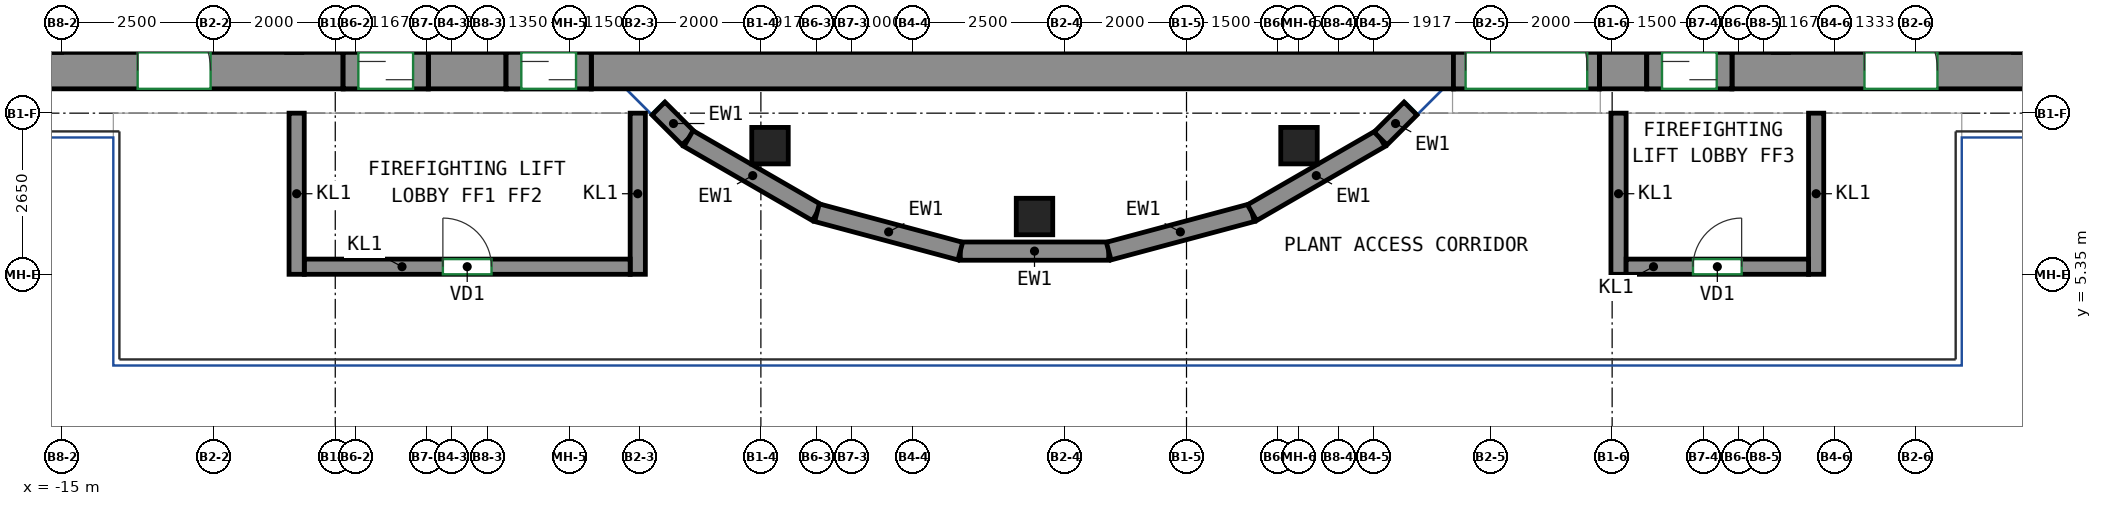
"""IFC4 building model, lengths in metres.
Left out: names, types, materials, properties, quantities, classifications, styles, units other than length and angle.
Written with IfcOpenShell. Run it as: python <this file> out.ifc"""

import sys

from ifc_helpers import new_model, si_unit, direction, frame, frame_2d, origin, origin_2d, place, context, subcontext, project, spatial, rectangle, extrude, source, transform, mapped, element, fill, save


model = new_model("IFC4")
c1 = context("Model", 3, precision=1e-05, world=origin(), true_north=direction((0.0, 1.0)))
c2 = subcontext(c1, "Body", "Model", "MODEL_VIEW")
j1 = project(units=[si_unit("LENGTHUNIT", "METRE"), si_unit("PLANEANGLEUNIT", "RADIAN")], contexts=[c1])
p1 = place(None, origin())
s1 = spatial("IfcSite", under=j1, at=p1, CompositionType="ELEMENT")
p2 = place(p1, origin())
s2 = spatial("IfcBuilding", under=s1, at=p2, CompositionType="ELEMENT")
p3 = place(p2, frame((0.0, 0.0, 323.8)))
s3 = spatial("IfcBuildingStorey", under=s2, at=p3, CompositionType="ELEMENT", Elevation=323.8)
m1 = source(origin(), c2, "Body", "SweptSolid", [
    extrude(rectangle(XDim=0.6, YDim=0.6, at=origin_2d()), origin(), (0.0, 0.0, 1.0), 4.6),
])
for number, where, z_axis, x_axis in (
    (1, (-3.35, 7.466, 0.0), (0.0, 0.0, 1.0), (1.0, 0.0, 0.0)),
    (2, (1.0, 6.3, 0.0), (0.0, 0.0, 1.0), (1.0, 0.0, 0.0)),
    (3, (5.35, 7.466, 0.0), (0.0, 0.0, 1.0), (1.0, 0.0, 0.0)),
):
    element("IfcColumn", number, at=place(p3, frame(where, z_axis=z_axis, x_axis=x_axis)), inside=s3, PredefinedType="COLUMN", context=c2, shape_type="MappedRepresentation", body=[
        mapped(m1, transform((0.0, 0.0, 0.0))),
    ])
m2 = source(origin(), c2, "Body", "SweptSolid", [
    extrude(rectangle(XDim=5.23, YDim=0.6, at=frame_2d((2.615, 0.0))), origin(), (0.0, 0.0, 1.0), 5.0),
])
p4 = place(p3, frame((-15.6, 8.7, -0.4), z_axis=(0.0, 0.0, 1.0), x_axis=(1.0, 0.0, 0.0)))
e4 = element("IfcWall", 4, at=p4, inside=s3, PredefinedType="SHEAR", context=c2, shape_type="MappedRepresentation", body=[
    mapped(m2, transform((0.0, 0.0, 0.0))),
])
p5 = place(p4, frame((1.85, 0.0, 0.4)))
e5 = element("IfcOpeningElement", 5, at=p5, cuts=e4, PredefinedType="OPENING", context=c2, shape_type="SweptSolid", body=[
    extrude(rectangle(XDim=1.2, YDim=2.1, at=frame_2d((0.6, 1.05))), frame((0.0, 0.31, 0.0), z_axis=(0.0, -1.0, 0.0), x_axis=(1.0, 0.0, 0.0)), (0.0, 0.0, 1.0), 0.62),
])
m3 = source(origin(), c2, "Body", "SweptSolid", [
    extrude(rectangle(XDim=1.28, YDim=0.6, at=frame_2d((0.64, 0.0))), origin(), (0.0, 0.0, 1.0), 5.0),
])
p6 = place(p3, frame((-8.97, 8.7, -0.4), z_axis=(0.0, 0.0, 1.0), x_axis=(1.0, 0.0, 0.0)))
e6 = element("IfcWall", 6, at=p6, inside=s3, PredefinedType="SHEAR", context=c2, shape_type="MappedRepresentation", body=[
    mapped(m3, transform((0.0, 0.0, 0.0))),
])
m4 = source(origin(), c2, "Body", "SweptSolid", [
    extrude(rectangle(XDim=14.18, YDim=0.6, at=frame_2d((7.09, 0.0))), origin(), (0.0, 0.0, 1.0), 4.6),
])
p7 = place(p3, frame((-6.29, 8.7, 0.0), z_axis=(0.0, 0.0, 1.0), x_axis=(1.0, 0.0, 0.0)))
e7 = element("IfcWall", 7, at=p7, inside=s3, PredefinedType="SHEAR", context=c2, shape_type="MappedRepresentation", body=[
    mapped(m4, transform((0.0, 0.0, 0.0))),
])
m5 = source(origin(), c2, "Body", "SweptSolid", [
    extrude(rectangle(XDim=0.78, YDim=0.6, at=frame_2d((0.39, 0.0))), origin(), (0.0, 0.0, 1.0), 5.0),
])
p8 = place(p3, frame((10.29, 8.7, -0.4), z_axis=(0.0, 0.0, 1.0), x_axis=(1.0, 0.0, 0.0)))
e8 = element("IfcWall", 8, at=p8, inside=s3, PredefinedType="SHEAR", context=c2, shape_type="MappedRepresentation", body=[
    mapped(m5, transform((0.0, 0.0, 0.0))),
])
p9 = place(p3, frame((12.47, 8.7, -0.4), z_axis=(0.0, 0.0, 1.0), x_axis=(1.0, 0.0, 0.0)))
e9 = element("IfcWall", 9, at=p9, inside=s3, PredefinedType="SHEAR", context=c2, shape_type="MappedRepresentation", body=[
    mapped(m2, transform((0.0, 0.0, 0.0))),
])
p10 = place(p9, frame((2.18, 0.0, 0.4)))
e10 = element("IfcOpeningElement", 10, at=p10, cuts=e9, PredefinedType="OPENING", context=c2, shape_type="SweptSolid", body=[
    extrude(rectangle(XDim=1.2, YDim=2.1, at=frame_2d((0.6, 1.05))), frame((0.0, 0.31, 0.0), z_axis=(0.0, -1.0, 0.0), x_axis=(1.0, 0.0, 0.0)), (0.0, 0.0, 1.0), 0.62),
])
m6 = source(origin(), c2, "Body", "SweptSolid", [
    extrude(rectangle(XDim=1.4, YDim=0.6, at=frame_2d((0.7, 0.0))), origin(), (0.0, 0.0, 1.0), 0.7),
])
p11 = place(p3, frame((-10.37, 8.7, 3.9), z_axis=(0.0, 0.0, 1.0), x_axis=(1.0, 0.0, 0.0)))
e11 = element("IfcWall", 11, at=p11, inside=s3, PredefinedType="SHEAR", context=c2, shape_type="MappedRepresentation", body=[
    mapped(m6, transform((0.0, 0.0, 0.0))),
])
m7 = source(origin(), c2, "Body", "SweptSolid", [
    extrude(rectangle(XDim=1.4, YDim=0.6, at=frame_2d((0.7, 0.0))), origin(), (0.0, 0.0, 1.0), 0.65),
])
p12 = place(p3, frame((-7.69, 8.7, 3.95), z_axis=(0.0, 0.0, 1.0), x_axis=(1.0, 0.0, 0.0)))
e12 = element("IfcWall", 12, at=p12, inside=s3, PredefinedType="SHEAR", context=c2, shape_type="MappedRepresentation", body=[
    mapped(m7, transform((0.0, 0.0, 0.0))),
])
m8 = source(origin(), c2, "Body", "SweptSolid", [
    extrude(rectangle(XDim=2.4, YDim=0.6, at=frame_2d((1.2, 0.0))), origin(), (0.0, 0.0, 1.0), 0.4),
])
p13 = place(p3, frame((7.89, 8.7, 4.2), z_axis=(0.0, 0.0, 1.0), x_axis=(1.0, 0.0, 0.0)))
e13 = element("IfcWall", 13, at=p13, inside=s3, PredefinedType="SHEAR", context=c2, shape_type="MappedRepresentation", body=[
    mapped(m8, transform((0.0, 0.0, 0.0))),
])
p14 = place(p3, frame((11.07, 8.7, 3.95), z_axis=(0.0, 0.0, 1.0), x_axis=(1.0, 0.0, 0.0)))
e14 = element("IfcWall", 14, at=p14, inside=s3, PredefinedType="SHEAR", context=c2, shape_type="MappedRepresentation", body=[
    mapped(m7, transform((0.0, 0.0, 0.0))),
])
m9 = source(origin(), c2, "Body", "SweptSolid", [
    extrude(rectangle(XDim=2.44, YDim=0.3, at=frame_2d((1.22, 0.0))), origin(), (0.0, 0.0, 1.0), 1.2),
])
p15 = place(p3, frame((-0.22, 5.731, 0.0), z_axis=(0.0, 0.0, 1.0), x_axis=(1.0, 0.0, 0.0)))
e15 = element("IfcWall", 15, at=p15, inside=s3, PredefinedType="SOLIDWALL", context=c2, shape_type="MappedRepresentation", body=[
    mapped(m9, transform((0.0, 0.0, 0.0))),
])
m10 = source(origin(), c2, "Body", "SweptSolid", [
    extrude(rectangle(XDim=2.441, YDim=0.3, at=frame_2d((1.22, 0.0))), origin(), (0.0, 0.0, 1.0), 1.2),
])
p16 = place(p3, frame((2.22, 5.731, 0.0), z_axis=(0.0, 0.0, 1.0), x_axis=(0.96593376363, 0.258789420724, 0.0)))
e16 = element("IfcWall", 16, at=p16, inside=s3, PredefinedType="SOLIDWALL", context=c2, shape_type="MappedRepresentation", body=[
    mapped(m10, transform((0.0, 0.0, 0.0))),
])
p17 = place(p3, frame((4.578, 6.363, 0.0), z_axis=(0.0, 0.0, 1.0), x_axis=(0.866030657337, 0.49999090047, 0.0)))
e17 = element("IfcWall", 17, at=p17, inside=s3, PredefinedType="SOLIDWALL", context=c2, shape_type="MappedRepresentation", body=[
    mapped(m9, transform((0.0, 0.0, 0.0))),
])
m11 = source(origin(), c2, "Body", "SweptSolid", [
    extrude(rectangle(XDim=0.697, YDim=0.3, at=frame_2d((0.349, 0.0))), origin(), (0.0, 0.0, 1.0), 1.2),
])
for number, where, z_axis, x_axis in (
    (18, (6.691, 7.583, 0.0), (0.0, 0.0, 1.0), (0.707, 0.707, 0.0)),
    (19, (-5.184, 8.076, 0.0), (0.0, 0.0, 1.0), (0.707, -0.707, 0.0)),
):
    element("IfcWall", number, at=place(p3, frame(where, z_axis=z_axis, x_axis=x_axis)), inside=s3, PredefinedType="SOLIDWALL", context=c2, shape_type="MappedRepresentation", body=[
        mapped(m11, transform((0.0, 0.0, 0.0))),
    ])
p18 = place(p3, frame((-4.691, 7.583, 0.0), z_axis=(0.0, 0.0, 1.0), x_axis=(0.866030657337, -0.49999090047, 0.0)))
e20 = element("IfcWall", 20, at=p18, inside=s3, PredefinedType="SOLIDWALL", context=c2, shape_type="MappedRepresentation", body=[
    mapped(m9, transform((0.0, 0.0, 0.0))),
])
p19 = place(p3, frame((-2.578, 6.363, 0.0), z_axis=(0.0, 0.0, 1.0), x_axis=(0.96593376363, -0.258789420724, 0.0)))
e21 = element("IfcWall", 21, at=p19, inside=s3, PredefinedType="SOLIDWALL", context=c2, shape_type="MappedRepresentation", body=[
    mapped(m10, transform((0.0, 0.0, 0.0))),
])
m12 = source(origin(), c2, "Body", "SweptSolid", [
    extrude(rectangle(XDim=2.65, YDim=0.25, at=frame_2d((1.325, 0.0))), origin(), (0.0, 0.0, 1.0), 4.6),
])
p20 = place(p3, frame((-5.525, 5.35, 0.0), z_axis=(0.0, 0.0, 1.0), x_axis=(0.0, 1.0, 0.0)))
e22 = element("IfcWall", 22, at=p20, inside=s3, PredefinedType="PARTITIONING", context=c2, shape_type="MappedRepresentation", body=[
    mapped(m12, transform((0.0, 0.0, 0.0))),
])
m13 = source(origin(), c2, "Body", "SweptSolid", [
    extrude(rectangle(XDim=5.36, YDim=0.25, at=frame_2d((2.68, 0.0))), origin(), (0.0, 0.0, 1.0), 4.6),
])
p21 = place(p3, frame((-11.01, 5.475, 0.0), z_axis=(0.0, 0.0, 1.0), x_axis=(1.0, 0.0, 0.0)))
e23 = element("IfcWall", 23, at=p21, inside=s3, PredefinedType="PARTITIONING", context=c2, shape_type="MappedRepresentation", body=[
    mapped(m13, transform((0.0, 0.0, 0.0))),
])
p22 = place(p21, frame((2.28, 0.0, 0.0)))
e24 = element("IfcOpeningElement", 24, at=p22, cuts=e23, PredefinedType="OPENING", context=c2, shape_type="SweptSolid", body=[
    extrude(rectangle(XDim=0.8, YDim=2.0, at=frame_2d((0.4, 1.0))), frame((0.0, 0.135, 0.0), z_axis=(0.0, -1.0, 0.0), x_axis=(1.0, 0.0, 0.0)), (0.0, 0.0, 1.0), 0.27),
])
for number, where, z_axis, x_axis in (
    (25, (-11.135, 5.35, 0.0), (0.0, 0.0, 1.0), (0.0, 1.0, 0.0)),
    (26, (10.605, 5.35, 0.0), (0.0, 0.0, 1.0), (0.0, 1.0, 0.0)),
    (27, (13.855, 5.35, 0.0), (0.0, 0.0, 1.0), (0.0, 1.0, 0.0)),
):
    element("IfcWall", number, at=place(p3, frame(where, z_axis=z_axis, x_axis=x_axis)), inside=s3, PredefinedType="PARTITIONING", context=c2, shape_type="MappedRepresentation", body=[
        mapped(m12, transform((0.0, 0.0, 0.0))),
    ])
m14 = source(origin(), c2, "Body", "SweptSolid", [
    extrude(rectangle(XDim=3.0, YDim=0.25, at=frame_2d((1.5, 0.0))), origin(), (0.0, 0.0, 1.0), 4.6),
])
p23 = place(p3, frame((10.73, 5.475, 0.0), z_axis=(0.0, 0.0, 1.0), x_axis=(1.0, 0.0, 0.0)))
e28 = element("IfcWall", 28, at=p23, inside=s3, PredefinedType="PARTITIONING", context=c2, shape_type="MappedRepresentation", body=[
    mapped(m14, transform((0.0, 0.0, 0.0))),
])
p24 = place(p23, frame((1.1, 0.0, 0.0)))
e29 = element("IfcOpeningElement", 29, at=p24, cuts=e28, PredefinedType="OPENING", context=c2, shape_type="SweptSolid", body=[
    extrude(rectangle(XDim=0.8, YDim=2.0, at=frame_2d((0.4, 1.0))), frame((0.0, 0.135, 0.0), z_axis=(0.0, -1.0, 0.0), x_axis=(1.0, 0.0, 0.0)), (0.0, 0.0, 1.0), 0.27),
])
m15 = source(origin(), c2, "Body", "SweptSolid", [
    extrude(rectangle(XDim=1.4, YDim=0.6, at=frame_2d((0.7, 0.0))), origin(), (0.0, 0.0, 1.0), 2.7),
])
p25 = place(p3, frame((-10.37, 8.7, 0.0), z_axis=(0.0, 0.0, 1.0), x_axis=(1.0, 0.0, 0.0)))
e30 = element("IfcWall", 30, at=p25, inside=s3, PredefinedType="PARTITIONING", context=c2, shape_type="MappedRepresentation", body=[
    mapped(m15, transform((0.0, 0.0, 0.0))),
])
p26 = place(p25, frame((0.25, 0.0, 0.0)))
e31 = element("IfcOpeningElement", 31, at=p26, cuts=e30, PredefinedType="OPENING", context=c2, shape_type="SweptSolid", body=[
    extrude(rectangle(XDim=0.9, YDim=2.1, at=frame_2d((0.45, 1.05))), frame((0.0, 0.31, 0.0), z_axis=(0.0, -1.0, 0.0), x_axis=(1.0, 0.0, 0.0)), (0.0, 0.0, 1.0), 0.62),
])
m16 = source(origin(), c2, "Body", "SweptSolid", [
    extrude(rectangle(XDim=1.4, YDim=0.6, at=frame_2d((0.7, 0.0))), origin(), (0.0, 0.0, 1.0), 2.7),
])
p27 = place(p3, frame((-7.69, 8.7, 0.0), z_axis=(0.0, 0.0, 1.0), x_axis=(1.0, 0.0, 0.0)))
e32 = element("IfcWall", 32, at=p27, inside=s3, PredefinedType="PARTITIONING", context=c2, shape_type="MappedRepresentation", body=[
    mapped(m16, transform((0.0, 0.0, 0.0))),
])
p28 = place(p27, frame((0.25, 0.0, 0.0)))
e33 = element("IfcOpeningElement", 33, at=p28, cuts=e32, PredefinedType="OPENING", context=c2, shape_type="SweptSolid", body=[
    extrude(rectangle(XDim=0.9, YDim=2.1, at=frame_2d((0.45, 1.05))), frame((0.0, 0.31, 0.0), z_axis=(0.0, -1.0, 0.0), x_axis=(1.0, 0.0, 0.0)), (0.0, 0.0, 1.0), 0.62),
])
m17 = source(origin(), c2, "Body", "SweptSolid", [
    extrude(rectangle(XDim=2.4, YDim=0.6, at=frame_2d((1.2, 0.0))), origin(), (0.0, 0.0, 1.0), 2.7),
])
p29 = place(p3, frame((7.89, 8.7, 0.0), z_axis=(0.0, 0.0, 1.0), x_axis=(1.0, 0.0, 0.0)))
e34 = element("IfcWall", 34, at=p29, inside=s3, PredefinedType="PARTITIONING", context=c2, shape_type="MappedRepresentation", body=[
    mapped(m17, transform((0.0, 0.0, 0.0))),
])
p30 = place(p29, frame((0.2, 0.0, 0.0)))
e35 = element("IfcOpeningElement", 35, at=p30, cuts=e34, PredefinedType="OPENING", context=c2, shape_type="SweptSolid", body=[
    extrude(rectangle(XDim=2.0, YDim=2.1, at=frame_2d((1.0, 1.05))), frame((0.0, 0.31, 0.0), z_axis=(0.0, -1.0, 0.0), x_axis=(1.0, 0.0, 0.0)), (0.0, 0.0, 1.0), 0.62),
])
p31 = place(p3, frame((11.07, 8.7, 0.0), z_axis=(0.0, 0.0, 1.0), x_axis=(1.0, 0.0, 0.0)))
e36 = element("IfcWall", 36, at=p31, inside=s3, PredefinedType="PARTITIONING", context=c2, shape_type="MappedRepresentation", body=[
    mapped(m16, transform((0.0, 0.0, 0.0))),
])
p32 = place(p31, frame((0.25, 0.0, 0.0)))
e37 = element("IfcOpeningElement", 37, at=p32, cuts=e36, PredefinedType="OPENING", context=c2, shape_type="SweptSolid", body=[
    extrude(rectangle(XDim=0.9, YDim=2.1, at=frame_2d((0.45, 1.05))), frame((0.0, 0.31, 0.0), z_axis=(0.0, -1.0, 0.0), x_axis=(1.0, 0.0, 0.0)), (0.0, 0.0, 1.0), 0.62),
])
p33 = place(p30, origin())
e38 = element("IfcDoor", 38, at=p33, inside=s3, OperationType="DOUBLE_DOOR_SINGLE_SWING", PredefinedType="DOOR", context=c2, shape_type="SweptSolid", body=[
    extrude(rectangle(XDim=2.0, YDim=2.1, at=frame_2d((1.0, 1.05))), frame((0.0, 0.205, 0.0), z_axis=(0.0, -1.0, 0.0), x_axis=(1.0, 0.0, 0.0)), (0.0, 0.0, 1.0), 0.05),
])
fill(e35, e38)
p34 = place(p22, origin())
e39 = element("IfcDoor", 39, at=p34, inside=s3, OperationType="SINGLE_SWING_LEFT", PredefinedType="DOOR", context=c2, shape_type="SweptSolid", body=[
    extrude(rectangle(XDim=0.8, YDim=2.0, at=frame_2d((0.4, 1.0))), frame((0.0, 0.025, 0.0), z_axis=(0.0, -1.0, 0.0), x_axis=(1.0, 0.0, 0.0)), (0.0, 0.0, 1.0), 0.05),
])
fill(e24, e39)
p35 = place(p24, origin())
e40 = element("IfcDoor", 40, at=p35, inside=s3, OperationType="SINGLE_SWING_RIGHT", PredefinedType="DOOR", context=c2, shape_type="SweptSolid", body=[
    extrude(rectangle(XDim=0.8, YDim=2.0, at=frame_2d((0.4, 1.0))), frame((0.0, 0.025, 0.0), z_axis=(0.0, -1.0, 0.0), x_axis=(1.0, 0.0, 0.0)), (0.0, 0.0, 1.0), 0.05),
])
fill(e29, e40)
p36 = place(p26, origin())
e41 = element("IfcDoor", 41, at=p36, inside=s3, OperationType="SLIDING_TO_LEFT", PredefinedType="DOOR", context=c2, shape_type="SweptSolid", body=[
    extrude(rectangle(XDim=0.9, YDim=2.1, at=frame_2d((0.45, 1.05))), frame((0.0, 0.205, 0.0), z_axis=(0.0, -1.0, 0.0), x_axis=(1.0, 0.0, 0.0)), (0.0, 0.0, 1.0), 0.05),
])
fill(e31, e41)
p37 = place(p28, origin())
e42 = element("IfcDoor", 42, at=p37, inside=s3, OperationType="SLIDING_TO_RIGHT", PredefinedType="DOOR", context=c2, shape_type="SweptSolid", body=[
    extrude(rectangle(XDim=0.9, YDim=2.1, at=frame_2d((0.45, 1.05))), frame((0.0, 0.205, 0.0), z_axis=(0.0, -1.0, 0.0), x_axis=(1.0, 0.0, 0.0)), (0.0, 0.0, 1.0), 0.05),
])
fill(e33, e42)
p38 = place(p32, origin())
e43 = element("IfcDoor", 43, at=p38, inside=s3, OperationType="SLIDING_TO_LEFT", PredefinedType="DOOR", context=c2, shape_type="SweptSolid", body=[
    extrude(rectangle(XDim=0.9, YDim=2.1, at=frame_2d((0.45, 1.05))), frame((0.0, 0.205, 0.0), z_axis=(0.0, -1.0, 0.0), x_axis=(1.0, 0.0, 0.0)), (0.0, 0.0, 1.0), 0.05),
])
fill(e37, e43)
p39 = place(p5, origin())
e44 = element("IfcDoor", 44, at=p39, inside=s3, OperationType="DOUBLE_DOOR_SINGLE_SWING", PredefinedType="DOOR", context=c2, shape_type="SweptSolid", body=[
    extrude(rectangle(XDim=1.2, YDim=2.1, at=frame_2d((0.6, 1.05))), frame((0.0, 0.205, 0.0), z_axis=(0.0, -1.0, 0.0), x_axis=(1.0, 0.0, 0.0)), (0.0, 0.0, 1.0), 0.05),
])
fill(e5, e44)
p40 = place(p10, origin())
e45 = element("IfcDoor", 45, at=p40, inside=s3, OperationType="DOUBLE_DOOR_SINGLE_SWING", PredefinedType="DOOR", context=c2, shape_type="SweptSolid", body=[
    extrude(rectangle(XDim=1.2, YDim=2.1, at=frame_2d((0.6, 1.05))), frame((0.0, 0.205, 0.0), z_axis=(0.0, -1.0, 0.0), x_axis=(1.0, 0.0, 0.0)), (0.0, 0.0, 1.0), 0.05),
])
fill(e10, e45)
save(model, sys.argv[1])
